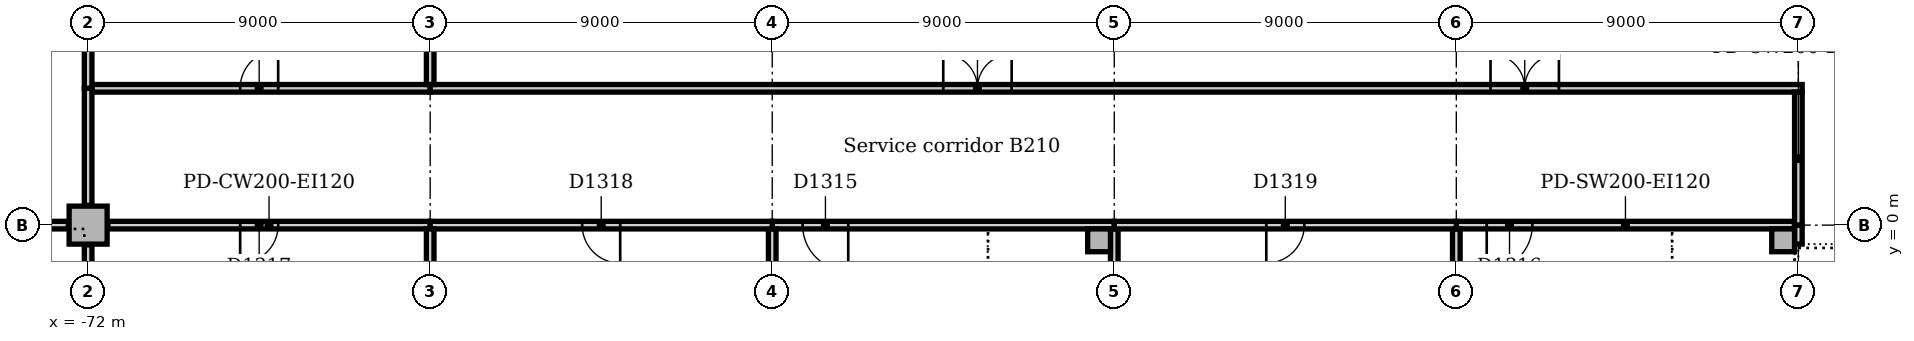
"""IFC4 building model, lengths in metres.
Left out: names, types, materials, properties, quantities, classifications, styles, units other than length and angle.
Written with IfcOpenShell. Run it as: python <this file> out.ifc"""

import sys

from ifc_helpers import new_model, si_unit, direction, frame, frame_2d, origin, origin_2d, place, context, subcontext, project, spatial, rectangle, extrude, element, fill, save


model = new_model("IFC4")
c1 = context("Model", 3, precision=1e-05, world=origin(), true_north=direction((0.0, 1.0)))
c2 = subcontext(c1, "Body", "Model", "MODEL_VIEW")
j1 = project(units=[si_unit("LENGTHUNIT", "METRE"), si_unit("PLANEANGLEUNIT", "RADIAN")], contexts=[c1])
p1 = place(None, origin())
s1 = spatial("IfcSite", under=j1, at=p1, CompositionType="ELEMENT")
p2 = place(p1, origin())
s2 = spatial("IfcBuilding", under=s1, at=p2, CompositionType="ELEMENT")
p3 = place(p2, frame((0.0, 0.0, -9.5)))
s3 = spatial("IfcBuildingStorey", under=s2, at=p3, CompositionType="ELEMENT", Elevation=-9.5)
p4 = place(p3, frame((-72.0, 0.0, 0.0), z_axis=(0.0, 0.0, 1.0), x_axis=(1.0, 0.0, 0.0)))
e1 = element("IfcColumn", 1, at=p4, inside=s3, PredefinedType="COLUMN", context=c2, shape_type="SweptSolid", body=[
    extrude(rectangle(XDim=1.0, YDim=1.0, at=origin_2d()), origin(), (0.0, 0.0, 1.0), 4.15),
])
for number, where, z_axis, x_axis in (
    (2, (-45.4, -0.4, 0.0), (0.0, 0.0, 1.0), (1.0, 0.0, 0.0)),
    (3, (-27.4, -0.4, 0.0), (0.0, 0.0, 1.0), (1.0, 0.0, 0.0)),
):
    element("IfcColumn", number, at=place(p3, frame(where, z_axis=z_axis, x_axis=x_axis)), inside=s3, PredefinedType="COLUMN", context=c2, shape_type="SweptSolid", body=[
        extrude(rectangle(XDim=0.6, YDim=0.6, at=origin_2d()), origin(), (0.0, 0.0, 1.0), 4.5),
    ])
p5 = place(p3, frame((-72.0, -4.65, 0.0), z_axis=(0.0, 0.0, 1.0), x_axis=(0.0, 1.0, 0.0)))
e4 = element("IfcWall", 4, at=p5, inside=s3, PredefinedType="SOLIDWALL", context=c2, shape_type="SweptSolid", body=[
    extrude(rectangle(XDim=4.13, YDim=0.2, at=frame_2d((2.065, 0.0))), origin(), (0.0, 0.0, 1.0), 4.15),
])
p6 = place(p3, frame((-80.48, 0.0, 0.0), z_axis=(0.0, 0.0, 1.0), x_axis=(1.0, 0.0, 0.0)))
e5 = element("IfcWall", 5, at=p6, inside=s3, PredefinedType="SOLIDWALL", context=c2, shape_type="SweptSolid", body=[
    extrude(rectangle(XDim=7.96, YDim=0.2, at=frame_2d((3.98, 0.0))), origin(), (0.0, 0.0, 1.0), 4.15),
])
p7 = place(p6, frame((0.3, 0.0, 0.0)))
e6 = element("IfcOpeningElement", 6, at=p7, cuts=e5, PredefinedType="OPENING", context=c2, shape_type="SweptSolid", body=[
    extrude(rectangle(XDim=1.2, YDim=2.1, at=frame_2d((0.6, 1.05))), frame((0.0, 0.11, 0.0), z_axis=(0.0, -1.0, 0.0), x_axis=(1.0, 0.0, 0.0)), (0.0, 0.0, 1.0), 0.22),
])
p8 = place(p3, frame((-54.0, 0.0, 0.0), z_axis=(0.0, 0.0, 1.0), x_axis=(1.0, 0.0, 0.0)))
e7 = element("IfcWall", 7, at=p8, inside=s3, PredefinedType="SOLIDWALL", context=c2, shape_type="SweptSolid", body=[
    extrude(rectangle(XDim=9.0, YDim=0.2, at=frame_2d((4.5, 0.0))), origin(), (0.0, 0.0, 1.0), 4.15),
])
p9 = place(p8, frame((0.8, 0.0, 0.0)))
e8 = element("IfcOpeningElement", 8, at=p9, cuts=e7, PredefinedType="OPENING", context=c2, shape_type="SweptSolid", body=[
    extrude(rectangle(XDim=1.2, YDim=2.1, at=frame_2d((0.6, 1.05))), frame((0.0, 0.11, 0.0), z_axis=(0.0, -1.0, 0.0), x_axis=(1.0, 0.0, 0.0)), (0.0, 0.0, 1.0), 0.22),
])
for number, where, z_axis, x_axis in (
    (9, (-54.0, -4.65, 0.0), (0.0, 0.0, 1.0), (0.0, 1.0, 0.0)),
    (10, (-45.0, -4.65, 0.0), (0.0, 0.0, 1.0), (0.0, 1.0, 0.0)),
):
    element("IfcWall", number, at=place(p3, frame(where, z_axis=z_axis, x_axis=x_axis)), inside=s3, PredefinedType="SOLIDWALL", context=c2, shape_type="SweptSolid", body=[
        extrude(rectangle(XDim=4.55, YDim=0.2, at=frame_2d((2.275, 0.0))), origin(), (0.0, 0.0, 1.0), 4.15),
    ])
p10 = place(p3, frame((-36.0, 0.0, 0.0), z_axis=(0.0, 0.0, 1.0), x_axis=(1.0, 0.0, 0.0)))
e11 = element("IfcWall", 11, at=p10, inside=s3, PredefinedType="SOLIDWALL", context=c2, shape_type="SweptSolid", body=[
    extrude(rectangle(XDim=8.9, YDim=0.2, at=frame_2d((4.45, 0.0))), origin(), (0.0, 0.0, 1.0), 4.15),
])
p11 = place(p10, frame((0.8, 0.0, 0.0)))
e12 = element("IfcOpeningElement", 12, at=p11, cuts=e11, PredefinedType="OPENING", context=c2, shape_type="SweptSolid", body=[
    extrude(rectangle(XDim=1.2, YDim=2.1, at=frame_2d((0.6, 1.05))), frame((0.0, 0.11, 0.0), z_axis=(0.0, -1.0, 0.0), x_axis=(1.0, 0.0, 0.0)), (0.0, 0.0, 1.0), 0.22),
])
p12 = place(p3, frame((-36.0, -4.65, 0.0), z_axis=(0.0, 0.0, 1.0), x_axis=(0.0, 1.0, 0.0)))
e13 = element("IfcWall", 13, at=p12, inside=s3, PredefinedType="SOLIDWALL", context=c2, shape_type="SweptSolid", body=[
    extrude(rectangle(XDim=4.55, YDim=0.2, at=frame_2d((2.275, 0.0))), origin(), (0.0, 0.0, 1.0), 4.15),
])
p13 = place(p3, frame((-27.0, -0.5, 0.0), z_axis=(0.0, 0.0, 1.0), x_axis=(0.0, 1.0, 0.0)))
e14 = element("IfcWall", 14, at=p13, inside=s3, PredefinedType="SOLIDWALL", context=c2, shape_type="SweptSolid", body=[
    extrude(rectangle(XDim=0.5, YDim=0.2, at=frame_2d((0.25, 0.0))), origin(), (0.0, 0.0, 1.0), 4.15),
])
p14 = place(p3, frame((-71.48, 0.0, 0.0), z_axis=(0.0, 0.0, 1.0), x_axis=(1.0, 0.0, 0.0)))
e15 = element("IfcWall", 15, at=p14, inside=s3, PredefinedType="PARTITIONING", context=c2, shape_type="SweptSolid", body=[
    extrude(rectangle(XDim=8.48, YDim=0.2, at=frame_2d((4.24, 0.0))), origin(), (0.0, 0.0, 1.0), 4.15),
])
p15 = place(p14, frame((3.48, 0.0, 0.0)))
e16 = element("IfcOpeningElement", 16, at=p15, cuts=e15, PredefinedType="OPENING", context=c2, shape_type="SweptSolid", body=[
    extrude(rectangle(XDim=1.0, YDim=2.1, at=frame_2d((0.5, 1.05))), frame((0.0, 0.11, 0.0), z_axis=(0.0, -1.0, 0.0), x_axis=(1.0, 0.0, 0.0)), (0.0, 0.0, 1.0), 0.22),
])
p16 = place(p3, frame((-63.0, 0.0, 0.0), z_axis=(0.0, 0.0, 1.0), x_axis=(1.0, 0.0, 0.0)))
e17 = element("IfcWall", 17, at=p16, inside=s3, PredefinedType="PARTITIONING", context=c2, shape_type="SweptSolid", body=[
    extrude(rectangle(XDim=9.0, YDim=0.2, at=frame_2d((4.5, 0.0))), origin(), (0.0, 0.0, 1.0), 4.15),
])
p17 = place(p16, frame((4.0, 0.0, 0.0)))
e18 = element("IfcOpeningElement", 18, at=p17, cuts=e17, PredefinedType="OPENING", context=c2, shape_type="SweptSolid", body=[
    extrude(rectangle(XDim=1.0, YDim=2.1, at=frame_2d((0.5, 1.05))), frame((0.0, 0.11, 0.0), z_axis=(0.0, -1.0, 0.0), x_axis=(1.0, 0.0, 0.0)), (0.0, 0.0, 1.0), 0.22),
])
p18 = place(p3, frame((-45.0, 0.0, 0.0), z_axis=(0.0, 0.0, 1.0), x_axis=(1.0, 0.0, 0.0)))
e19 = element("IfcWall", 19, at=p18, inside=s3, PredefinedType="PARTITIONING", context=c2, shape_type="SweptSolid", body=[
    extrude(rectangle(XDim=9.0, YDim=0.2, at=frame_2d((4.5, 0.0))), origin(), (0.0, 0.0, 1.0), 4.15),
])
p19 = place(p18, frame((4.0, 0.0, 0.0)))
e20 = element("IfcOpeningElement", 20, at=p19, cuts=e19, PredefinedType="OPENING", context=c2, shape_type="SweptSolid", body=[
    extrude(rectangle(XDim=1.0, YDim=2.1, at=frame_2d((0.5, 1.05))), frame((0.0, 0.11, 0.0), z_axis=(0.0, -1.0, 0.0), x_axis=(1.0, 0.0, 0.0)), (0.0, 0.0, 1.0), 0.22),
])
p20 = place(p3, frame((-71.9, 3.6, 0.0), z_axis=(0.0, 0.0, 1.0), x_axis=(1.0, 0.0, 0.0)))
e21 = element("IfcWall", 21, at=p20, inside=s3, PredefinedType="PARTITIONING", context=c2, shape_type="SweptSolid", body=[
    extrude(rectangle(XDim=8.9, YDim=0.2, at=frame_2d((4.45, 0.0))), origin(), (0.0, 0.0, 1.0), 4.15),
])
p21 = place(p20, frame((3.9, 0.0, 0.0)))
e22 = element("IfcOpeningElement", 22, at=p21, cuts=e21, PredefinedType="OPENING", context=c2, shape_type="SweptSolid", body=[
    extrude(rectangle(XDim=1.0, YDim=2.1, at=frame_2d((0.5, 1.05))), frame((0.0, 0.11, 0.0), z_axis=(0.0, -1.0, 0.0), x_axis=(1.0, 0.0, 0.0)), (0.0, 0.0, 1.0), 0.22),
])
p22 = place(p3, frame((-63.0, 3.6, 0.0), z_axis=(0.0, 0.0, 1.0), x_axis=(1.0, 0.0, 0.0)))
e23 = element("IfcWall", 23, at=p22, inside=s3, PredefinedType="PARTITIONING", context=c2, shape_type="SweptSolid", body=[
    extrude(rectangle(XDim=36.1, YDim=0.2, at=frame_2d((18.05, 0.0))), origin(), (0.0, 0.0, 1.0), 4.15),
])
p23 = place(p22, frame((13.5, 0.0, 0.0)))
e24 = element("IfcOpeningElement", 24, at=p23, cuts=e23, PredefinedType="OPENING", context=c2, shape_type="SweptSolid", body=[
    extrude(rectangle(XDim=1.8, YDim=2.1, at=frame_2d((0.9, 1.05))), frame((0.0, 0.11, 0.0), z_axis=(0.0, -1.0, 0.0), x_axis=(1.0, 0.0, 0.0)), (0.0, 0.0, 1.0), 0.22),
])
p24 = place(p22, frame((27.9, 0.0, 0.0)))
e25 = element("IfcOpeningElement", 25, at=p24, cuts=e23, PredefinedType="OPENING", context=c2, shape_type="SweptSolid", body=[
    extrude(rectangle(XDim=1.8, YDim=2.1, at=frame_2d((0.9, 1.05))), frame((0.0, 0.11, 0.0), z_axis=(0.0, -1.0, 0.0), x_axis=(1.0, 0.0, 0.0)), (0.0, 0.0, 1.0), 0.22),
])
p25 = place(p3, frame((-27.0, 0.0, 0.0), z_axis=(0.0, 0.0, 1.0), x_axis=(0.0, 1.0, 0.0)))
e26 = element("IfcWall", 26, at=p25, inside=s3, PredefinedType="PARTITIONING", context=c2, shape_type="SweptSolid", body=[
    extrude(rectangle(XDim=3.5, YDim=0.2, at=frame_2d((1.75, 0.0))), origin(), (0.0, 0.0, 1.0), 4.15),
])
p26 = place(p3, frame((-72.0, 0.52, 0.0), z_axis=(0.0, 0.0, 1.0), x_axis=(0.0, 1.0, 0.0)))
e27 = element("IfcWall", 27, at=p26, inside=s3, PredefinedType="PARTITIONING", context=c2, shape_type="SweptSolid", body=[
    extrude(rectangle(XDim=3.08, YDim=0.2, at=frame_2d((1.54, 0.0))), origin(), (0.0, 0.0, 1.0), 4.15),
])
p27 = place(p3, frame((-63.0, -8.48, 0.0), z_axis=(0.0, 0.0, 1.0), x_axis=(0.0, 1.0, 0.0)))
e28 = element("IfcWall", 28, at=p27, inside=s3, PredefinedType="PARTITIONING", context=c2, shape_type="SweptSolid", body=[
    extrude(rectangle(XDim=8.38, YDim=0.2, at=frame_2d((4.19, 0.0))), origin(), (0.0, 0.0, 1.0), 4.15),
])
p28 = place(p3, frame((-63.0, 3.7, 0.0), z_axis=(0.0, 0.0, 1.0), x_axis=(0.0, 1.0, 0.0)))
e29 = element("IfcWall", 29, at=p28, inside=s3, PredefinedType="PARTITIONING", context=c2, shape_type="SweptSolid", body=[
    extrude(rectangle(XDim=1.683, YDim=0.2, at=frame_2d((0.842, 0.0))), origin(), (0.0, 0.0, 1.0), 4.15),
])
p29 = place(p3, frame((-72.0, 3.6, 0.0), z_axis=(0.0, 0.0, 1.0), x_axis=(0.0, 1.0, 0.0)))
e30 = element("IfcWall", 30, at=p29, inside=s3, PredefinedType="PARTITIONING", context=c2, shape_type="SweptSolid", body=[
    extrude(rectangle(XDim=17.3, YDim=0.2, at=frame_2d((8.65, 0.0))), origin(), (0.0, 0.0, 1.0), 4.15),
])
p30 = place(p23, origin())
e31 = element("IfcDoor", 31, at=p30, inside=s3, OperationType="DOUBLE_DOOR_SINGLE_SWING", PredefinedType="DOOR", context=c2, shape_type="SweptSolid", body=[
    extrude(rectangle(XDim=1.8, YDim=2.1, at=frame_2d((0.9, 1.05))), frame((0.0, 0.025, 0.0), z_axis=(0.0, -1.0, 0.0), x_axis=(1.0, 0.0, 0.0)), (0.0, 0.0, 1.0), 0.05),
])
fill(e24, e31)
p31 = place(p24, origin())
e32 = element("IfcDoor", 32, at=p31, inside=s3, OperationType="DOUBLE_DOOR_SINGLE_SWING", PredefinedType="DOOR", context=c2, shape_type="SweptSolid", body=[
    extrude(rectangle(XDim=1.8, YDim=2.1, at=frame_2d((0.9, 1.05))), frame((0.0, 0.025, 0.0), z_axis=(0.0, -1.0, 0.0), x_axis=(1.0, 0.0, 0.0)), (0.0, 0.0, 1.0), 0.05),
])
fill(e25, e32)
p32 = place(p9, frame((1.2, 0.0, 0.0), z_axis=(0.0, 0.0, 1.0), x_axis=(-1.0, 0.0, 0.0)))
e33 = element("IfcDoor", 33, at=p32, inside=s3, OperationType="SINGLE_SWING_LEFT", PredefinedType="DOOR", context=c2, shape_type="SweptSolid", body=[
    extrude(rectangle(XDim=1.2, YDim=2.1, at=frame_2d((0.6, 1.05))), frame((0.0, 0.025, 0.0), z_axis=(0.0, -1.0, 0.0), x_axis=(1.0, 0.0, 0.0)), (0.0, 0.0, 1.0), 0.05),
])
fill(e8, e33)
p33 = place(p11, frame((1.2, 0.0, 0.0), z_axis=(0.0, 0.0, 1.0), x_axis=(-1.0, 0.0, 0.0)))
e34 = element("IfcDoor", 34, at=p33, inside=s3, OperationType="SINGLE_SWING_RIGHT", PredefinedType="DOOR", context=c2, shape_type="SweptSolid", body=[
    extrude(rectangle(XDim=1.2, YDim=2.1, at=frame_2d((0.6, 1.05))), frame((0.0, 0.025, 0.0), z_axis=(0.0, -1.0, 0.0), x_axis=(1.0, 0.0, 0.0)), (0.0, 0.0, 1.0), 0.05),
])
fill(e12, e34)
p34 = place(p15, frame((1.0, 0.0, 0.0), z_axis=(0.0, 0.0, 1.0), x_axis=(-1.0, 0.0, 0.0)))
e35 = element("IfcDoor", 35, at=p34, inside=s3, OperationType="SINGLE_SWING_RIGHT", PredefinedType="DOOR", context=c2, shape_type="SweptSolid", body=[
    extrude(rectangle(XDim=1.0, YDim=2.1, at=frame_2d((0.5, 1.05))), frame((0.0, 0.025, 0.0), z_axis=(0.0, -1.0, 0.0), x_axis=(1.0, 0.0, 0.0)), (0.0, 0.0, 1.0), 0.05),
])
fill(e16, e35)
p35 = place(p17, frame((1.0, 0.0, 0.0), z_axis=(0.0, 0.0, 1.0), x_axis=(-1.0, 0.0, 0.0)))
e36 = element("IfcDoor", 36, at=p35, inside=s3, OperationType="SINGLE_SWING_LEFT", PredefinedType="DOOR", context=c2, shape_type="SweptSolid", body=[
    extrude(rectangle(XDim=1.0, YDim=2.1, at=frame_2d((0.5, 1.05))), frame((0.0, 0.025, 0.0), z_axis=(0.0, -1.0, 0.0), x_axis=(1.0, 0.0, 0.0)), (0.0, 0.0, 1.0), 0.05),
])
fill(e18, e36)
p36 = place(p19, frame((1.0, 0.0, 0.0), z_axis=(0.0, 0.0, 1.0), x_axis=(-1.0, 0.0, 0.0)))
e37 = element("IfcDoor", 37, at=p36, inside=s3, OperationType="SINGLE_SWING_RIGHT", PredefinedType="DOOR", context=c2, shape_type="SweptSolid", body=[
    extrude(rectangle(XDim=1.0, YDim=2.1, at=frame_2d((0.5, 1.05))), frame((0.0, 0.025, 0.0), z_axis=(0.0, -1.0, 0.0), x_axis=(1.0, 0.0, 0.0)), (0.0, 0.0, 1.0), 0.05),
])
fill(e20, e37)
p37 = place(p21, origin())
e38 = element("IfcDoor", 38, at=p37, inside=s3, OperationType="SINGLE_SWING_RIGHT", PredefinedType="DOOR", context=c2, shape_type="SweptSolid", body=[
    extrude(rectangle(XDim=1.0, YDim=2.1, at=frame_2d((0.5, 1.05))), frame((0.0, 0.025, 0.0), z_axis=(0.0, -1.0, 0.0), x_axis=(1.0, 0.0, 0.0)), (0.0, 0.0, 1.0), 0.05),
])
fill(e22, e38)
save(model, sys.argv[1])
